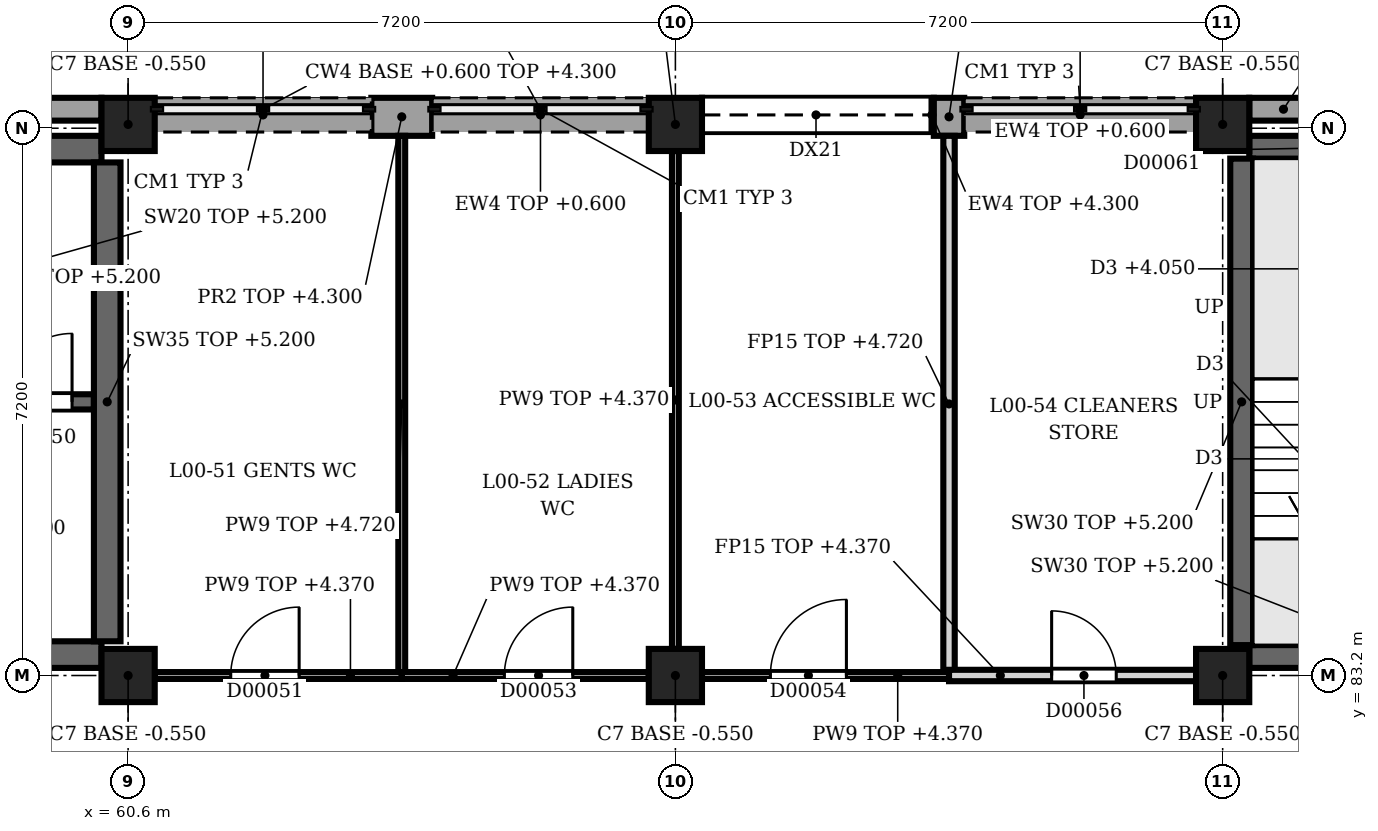
"""IFC4 building model, lengths in metres.
Left out: names, types, materials, properties, quantities, classifications, styles, units other than length and angle.
Written with IfcOpenShell. Run it as: python <this file> out.ifc"""

import sys

from ifc_helpers import new_model, si_unit, direction, frame, frame_2d, origin, origin_2d, place, context, subcontext, project, spatial, rectangle, extrude, element, fill, save


model = new_model("IFC4")
c1 = context("Model", 3, precision=1e-05, world=origin(), true_north=direction((0.0, 1.0)))
c2 = subcontext(c1, "Body", "Model", "MODEL_VIEW")
j1 = project(units=[si_unit("LENGTHUNIT", "METRE"), si_unit("PLANEANGLEUNIT", "RADIAN")], contexts=[c1])
p1 = place(None, origin())
s1 = spatial("IfcSite", under=j1, at=p1, CompositionType="ELEMENT")
p2 = place(p1, origin())
s2 = spatial("IfcBuilding", under=s1, at=p2, CompositionType="ELEMENT")
p3 = place(p2, origin())
s3 = spatial("IfcBuildingStorey", under=s2, at=p3, CompositionType="ELEMENT", Elevation=0.0)
for number, where, z_axis, x_axis in (
    (1, (60.6, 83.2, -0.55), (0.0, 0.0, 1.0), (1.0, 0.0, 0.0)),
    (2, (60.6, 90.45, -0.55), (0.0, 0.0, 1.0), (1.0, 0.0, 0.0)),
    (3, (67.8, 83.2, -0.55), (0.0, 0.0, 1.0), (1.0, 0.0, 0.0)),
    (4, (67.8, 90.45, -0.55), (0.0, 0.0, 1.0), (1.0, 0.0, 0.0)),
    (5, (75.0, 83.2, -0.55), (0.0, 0.0, 1.0), (1.0, 0.0, 0.0)),
    (6, (75.0, 90.45, -0.55), (0.0, 0.0, 1.0), (1.0, 0.0, 0.0)),
):
    element("IfcColumn", number, at=place(p3, frame(where, z_axis=z_axis, x_axis=x_axis)), inside=s3, PredefinedType="COLUMN", context=c2, shape_type="SweptSolid", body=[
        extrude(rectangle(XDim=0.7, YDim=0.7, at=origin_2d()), origin(), (0.0, 0.0, 1.0), 5.95),
    ])
p4 = place(p3, frame((63.8, 90.55, 0.0), z_axis=(0.0, 0.0, 1.0), x_axis=(1.0, 0.0, 0.0)))
e7 = element("IfcWall", 7, at=p4, inside=s3, PredefinedType="SOLIDWALL", context=c2, shape_type="SweptSolid", body=[
    extrude(rectangle(XDim=0.8, YDim=0.5, at=frame_2d((0.4, 0.0))), origin(), (0.0, 0.0, 1.0), 4.3),
])
p5 = place(p3, frame((71.2, 90.55, 0.0), z_axis=(0.0, 0.0, 1.0), x_axis=(1.0, 0.0, 0.0)))
e8 = element("IfcWall", 8, at=p5, inside=s3, PredefinedType="SOLIDWALL", context=c2, shape_type="SweptSolid", body=[
    extrude(rectangle(XDim=0.4, YDim=0.5, at=frame_2d((0.2, 0.0))), origin(), (0.0, 0.0, 1.0), 4.3),
])
p6 = place(p3, frame((57.4, 90.65, 0.0), z_axis=(0.0, 0.0, 1.0), x_axis=(1.0, 0.0, 0.0)))
e9 = element("IfcWall", 9, at=p6, inside=s3, PredefinedType="SOLIDWALL", context=c2, shape_type="SweptSolid", body=[
    extrude(rectangle(XDim=2.85, YDim=0.3, at=frame_2d((1.425, 0.0))), origin(), (0.0, 0.0, 1.0), 4.3),
])
p7 = place(p3, frame((60.95, 90.575, 0.0), z_axis=(0.0, 0.0, 1.0), x_axis=(1.0, 0.0, 0.0)))
e10 = element("IfcWall", 10, at=p7, inside=s3, PredefinedType="SOLIDWALL", context=c2, shape_type="SweptSolid", body=[
    extrude(rectangle(XDim=2.85, YDim=0.45, at=frame_2d((1.425, 0.0))), origin(), (0.0, 0.0, 1.0), 0.6),
])
p8 = place(p3, frame((64.6, 90.575, 0.0), z_axis=(0.0, 0.0, 1.0), x_axis=(1.0, 0.0, 0.0)))
e11 = element("IfcWall", 11, at=p8, inside=s3, PredefinedType="SOLIDWALL", context=c2, shape_type="SweptSolid", body=[
    extrude(rectangle(XDim=2.85, YDim=0.45, at=frame_2d((1.425, 0.0))), origin(), (0.0, 0.0, 1.0), 0.6),
])
p9 = place(p3, frame((68.15, 90.575, 0.0), z_axis=(0.0, 0.0, 1.0), x_axis=(1.0, 0.0, 0.0)))
e12 = element("IfcWall", 12, at=p9, inside=s3, PredefinedType="SOLIDWALL", context=c2, shape_type="SweptSolid", body=[
    extrude(rectangle(XDim=3.05, YDim=0.45, at=frame_2d((1.525, 0.0))), origin(), (0.0, 0.0, 1.0), 4.3),
])
p10 = place(p9, origin())
e13 = element("IfcOpeningElement", 13, at=p10, cuts=e12, PredefinedType="OPENING", context=c2, shape_type="SweptSolid", body=[
    extrude(rectangle(XDim=3.0, YDim=3.0, at=frame_2d((1.5, 1.5))), frame((0.0, 0.235, 0.0), z_axis=(0.0, -1.0, 0.0), x_axis=(1.0, 0.0, 0.0)), (0.0, 0.0, 1.0), 0.47),
])
p11 = place(p3, frame((71.6, 90.575, 0.0), z_axis=(0.0, 0.0, 1.0), x_axis=(1.0, 0.0, 0.0)))
e14 = element("IfcWall", 14, at=p11, inside=s3, PredefinedType="SOLIDWALL", context=c2, shape_type="SweptSolid", body=[
    extrude(rectangle(XDim=3.05, YDim=0.45, at=frame_2d((1.525, 0.0))), origin(), (0.0, 0.0, 1.0), 0.6),
])
p12 = place(p3, frame((75.35, 90.65, 0.0), z_axis=(0.0, 0.0, 1.0), x_axis=(1.0, 0.0, 0.0)))
e15 = element("IfcWall", 15, at=p12, inside=s3, PredefinedType="SOLIDWALL", context=c2, shape_type="SweptSolid", body=[
    extrude(rectangle(XDim=2.85, YDim=0.3, at=frame_2d((1.425, 0.0))), origin(), (0.0, 0.0, 1.0), 4.3),
])
p13 = place(p12, frame((0.9, 0.0, 0.0)))
e16 = element("IfcOpeningElement", 16, at=p13, cuts=e15, PredefinedType="OPENING", context=c2, shape_type="SweptSolid", body=[
    extrude(rectangle(XDim=1.1, YDim=2.2, at=frame_2d((0.55, 1.1))), frame((0.0, 0.16, 0.0), z_axis=(0.0, -1.0, 0.0), x_axis=(1.0, 0.0, 0.0)), (0.0, 0.0, 1.0), 0.32),
])
p14 = place(p12, frame((0.9, 0.0, 2.3)))
e17 = element("IfcOpeningElement", 17, at=p14, cuts=e15, PredefinedType="OPENING", context=c2, shape_type="SweptSolid", body=[
    extrude(rectangle(XDim=1.1, YDim=0.45, at=frame_2d((0.55, 0.225))), frame((0.0, 0.16, 0.0), z_axis=(0.0, -1.0, 0.0), x_axis=(1.0, 0.0, 0.0)), (0.0, 0.0, 1.0), 0.32),
])
p15 = place(p3, frame((53.75, 83.475, 0.0), z_axis=(0.0, 0.0, 1.0), x_axis=(1.0, 0.0, 0.0)))
e18 = element("IfcWall", 18, at=p15, inside=s3, PredefinedType="SHEAR", context=c2, shape_type="SweptSolid", body=[
    extrude(rectangle(XDim=6.5, YDim=0.35, at=frame_2d((3.25, 0.0))), origin(), (0.0, 0.0, 1.0), 5.2),
])
p16 = place(p15, frame((2.65, 0.0, 0.0)))
e19 = element("IfcOpeningElement", 19, at=p16, cuts=e18, PredefinedType="OPENING", context=c2, shape_type="SweptSolid", body=[
    extrude(rectangle(XDim=1.8, YDim=2.1, at=frame_2d((0.9, 1.05))), frame((0.0, 0.185, 0.0), z_axis=(0.0, -1.0, 0.0), x_axis=(1.0, 0.0, 0.0)), (0.0, 0.0, 1.0), 0.37),
])
p17 = place(p3, frame((53.75, 90.125, 0.0), z_axis=(0.0, 0.0, 1.0), x_axis=(1.0, 0.0, 0.0)))
e20 = element("IfcWall", 20, at=p17, inside=s3, PredefinedType="SHEAR", context=c2, shape_type="SweptSolid", body=[
    extrude(rectangle(XDim=6.5, YDim=0.35, at=frame_2d((3.25, 0.0))), origin(), (0.0, 0.0, 1.0), 5.2),
])
p18 = place(p3, frame((60.325, 83.65, 0.0), z_axis=(0.0, 0.0, 1.0), x_axis=(0.0, 1.0, 0.0)))
e21 = element("IfcWall", 21, at=p18, inside=s3, PredefinedType="SHEAR", context=c2, shape_type="SweptSolid", body=[
    extrude(rectangle(XDim=6.3, YDim=0.35, at=frame_2d((3.15, 0.0))), origin(), (0.0, 0.0, 1.0), 5.2),
])
p19 = place(p3, frame((60.15, 86.8, 0.0), z_axis=(0.0, 0.0, 1.0), x_axis=(-1.0, 0.0, 0.0)))
e22 = element("IfcWall", 22, at=p19, inside=s3, PredefinedType="SHEAR", context=c2, shape_type="SweptSolid", body=[
    extrude(rectangle(XDim=3.15, YDim=0.2, at=frame_2d((1.575, 0.0))), origin(), (0.0, 0.0, 1.0), 5.2),
])
p20 = place(p19, frame((1.962, 0.0, 0.0)))
e23 = element("IfcOpeningElement", 23, at=p20, cuts=e22, PredefinedType="OPENING", context=c2, shape_type="SweptSolid", body=[
    extrude(rectangle(XDim=0.9, YDim=2.1, at=frame_2d((0.45, 1.05))), frame((0.0, 0.11, 0.0), z_axis=(0.0, -1.0, 0.0), x_axis=(1.0, 0.0, 0.0)), (0.0, 0.0, 1.0), 0.22),
])
p21 = place(p19, frame((0.288, 0.0, 0.0)))
e24 = element("IfcOpeningElement", 24, at=p21, cuts=e22, PredefinedType="OPENING", context=c2, shape_type="SweptSolid", body=[
    extrude(rectangle(XDim=0.9, YDim=2.1, at=frame_2d((0.45, 1.05))), frame((0.0, 0.11, 0.0), z_axis=(0.0, -1.0, 0.0), x_axis=(1.0, 0.0, 0.0)), (0.0, 0.0, 1.0), 0.22),
])
p22 = place(p3, frame((75.35, 83.45, 0.0), z_axis=(0.0, 0.0, 1.0), x_axis=(1.0, 0.0, 0.0)))
e25 = element("IfcWall", 25, at=p22, inside=s3, PredefinedType="SHEAR", context=c2, shape_type="SweptSolid", body=[
    extrude(rectangle(XDim=6.5, YDim=0.3, at=frame_2d((3.25, 0.0))), origin(), (0.0, 0.0, 1.0), 5.2),
])
p23 = place(p22, frame((4.25, 0.0, 0.0)))
e26 = element("IfcOpeningElement", 26, at=p23, cuts=e25, PredefinedType="OPENING", context=c2, shape_type="SweptSolid", body=[
    extrude(rectangle(XDim=1.2, YDim=2.1, at=frame_2d((0.6, 1.05))), frame((0.0, 0.16, 0.0), z_axis=(0.0, -1.0, 0.0), x_axis=(1.0, 0.0, 0.0)), (0.0, 0.0, 1.0), 0.32),
])
p24 = place(p3, frame((75.35, 90.15, 0.0), z_axis=(0.0, 0.0, 1.0), x_axis=(1.0, 0.0, 0.0)))
e27 = element("IfcWall", 27, at=p24, inside=s3, PredefinedType="SHEAR", context=c2, shape_type="SweptSolid", body=[
    extrude(rectangle(XDim=6.5, YDim=0.3, at=frame_2d((3.25, 0.0))), origin(), (0.0, 0.0, 1.0), 5.2),
])
p25 = place(p24, frame((0.9, 0.0, 0.0)))
e28 = element("IfcOpeningElement", 28, at=p25, cuts=e27, PredefinedType="OPENING", context=c2, shape_type="SweptSolid", body=[
    extrude(rectangle(XDim=1.1, YDim=2.1, at=frame_2d((0.55, 1.05))), frame((0.0, 0.16, 0.0), z_axis=(0.0, -1.0, 0.0), x_axis=(1.0, 0.0, 0.0)), (0.0, 0.0, 1.0), 0.32),
])
p26 = place(p3, frame((75.25, 83.6, 0.0), z_axis=(0.0, 0.0, 1.0), x_axis=(0.0, 1.0, 0.0)))
e29 = element("IfcWall", 29, at=p26, inside=s3, PredefinedType="SHEAR", context=c2, shape_type="SweptSolid", body=[
    extrude(rectangle(XDim=6.4, YDim=0.3, at=frame_2d((3.2, 0.0))), origin(), (0.0, 0.0, 1.0), 5.2),
])
p27 = place(p3, frame((60.95, 83.2, 0.0), z_axis=(0.0, 0.0, 1.0), x_axis=(1.0, 0.0, 0.0)))
e30 = element("IfcWall", 30, at=p27, inside=s3, PredefinedType="PARTITIONING", context=c2, shape_type="SweptSolid", body=[
    extrude(rectangle(XDim=3.25, YDim=0.09, at=frame_2d((1.625, 0.0))), origin(), (0.0, 0.0, 1.0), 4.37),
])
p28 = place(p27, frame((1.0, 0.0, 0.0)))
e31 = element("IfcOpeningElement", 31, at=p28, cuts=e30, PredefinedType="OPENING", context=c2, shape_type="SweptSolid", body=[
    extrude(rectangle(XDim=0.9, YDim=2.1, at=frame_2d((0.45, 1.05))), frame((0.0, 0.055, 0.0), z_axis=(0.0, -1.0, 0.0), x_axis=(1.0, 0.0, 0.0)), (0.0, 0.0, 1.0), 0.11),
])
p29 = place(p3, frame((64.2, 83.2, 0.0), z_axis=(0.0, 0.0, 1.0), x_axis=(1.0, 0.0, 0.0)))
e32 = element("IfcWall", 32, at=p29, inside=s3, PredefinedType="PARTITIONING", context=c2, shape_type="SweptSolid", body=[
    extrude(rectangle(XDim=3.25, YDim=0.09, at=frame_2d((1.625, 0.0))), origin(), (0.0, 0.0, 1.0), 4.37),
])
p30 = place(p29, frame((1.35, 0.0, 0.0)))
e33 = element("IfcOpeningElement", 33, at=p30, cuts=e32, PredefinedType="OPENING", context=c2, shape_type="SweptSolid", body=[
    extrude(rectangle(XDim=0.9, YDim=2.1, at=frame_2d((0.45, 1.05))), frame((0.0, 0.055, 0.0), z_axis=(0.0, -1.0, 0.0), x_axis=(1.0, 0.0, 0.0)), (0.0, 0.0, 1.0), 0.11),
])
p31 = place(p3, frame((68.15, 83.2, 0.0), z_axis=(0.0, 0.0, 1.0), x_axis=(1.0, 0.0, 0.0)))
e34 = element("IfcWall", 34, at=p31, inside=s3, PredefinedType="PARTITIONING", context=c2, shape_type="SweptSolid", body=[
    extrude(rectangle(XDim=3.25, YDim=0.09, at=frame_2d((1.625, 0.0))), origin(), (0.0, 0.0, 1.0), 4.37),
])
p32 = place(p31, frame((0.9, 0.0, 0.0)))
e35 = element("IfcOpeningElement", 35, at=p32, cuts=e34, PredefinedType="OPENING", context=c2, shape_type="SweptSolid", body=[
    extrude(rectangle(XDim=1.0, YDim=2.2, at=frame_2d((0.5, 1.1))), frame((0.0, 0.055, 0.0), z_axis=(0.0, -1.0, 0.0), x_axis=(1.0, 0.0, 0.0)), (0.0, 0.0, 1.0), 0.11),
])
p33 = place(p3, frame((71.4, 83.2, 0.0), z_axis=(0.0, 0.0, 1.0), x_axis=(1.0, 0.0, 0.0)))
e36 = element("IfcWall", 36, at=p33, inside=s3, PredefinedType="PARTITIONING", context=c2, shape_type="SweptSolid", body=[
    extrude(rectangle(XDim=3.25, YDim=0.15, at=frame_2d((1.625, 0.0))), origin(), (0.0, 0.0, 1.0), 4.37),
])
p34 = place(p33, frame((1.35, 0.0, 0.0)))
e37 = element("IfcOpeningElement", 37, at=p34, cuts=e36, PredefinedType="OPENING", context=c2, shape_type="SweptSolid", body=[
    extrude(rectangle(XDim=0.85, YDim=2.1, at=frame_2d((0.425, 1.05))), frame((0.0, 0.085, 0.0), z_axis=(0.0, -1.0, 0.0), x_axis=(1.0, 0.0, 0.0)), (0.0, 0.0, 1.0), 0.17),
])
p35 = place(p3, frame((64.2, 83.245, 0.0), z_axis=(0.0, 0.0, 1.0), x_axis=(0.0, 1.0, 0.0)))
e38 = element("IfcWall", 38, at=p35, inside=s3, PredefinedType="PARTITIONING", context=c2, shape_type="SweptSolid", body=[
    extrude(rectangle(XDim=7.055, YDim=0.09, at=frame_2d((3.527, 0.0))), origin(), (0.0, 0.0, 1.0), 4.72),
])
p36 = place(p3, frame((67.8, 83.55, 0.0), z_axis=(0.0, 0.0, 1.0), x_axis=(0.0, 1.0, 0.0)))
e39 = element("IfcWall", 39, at=p36, inside=s3, PredefinedType="PARTITIONING", context=c2, shape_type="SweptSolid", body=[
    extrude(rectangle(XDim=6.55, YDim=0.09, at=frame_2d((3.275, 0.0))), origin(), (0.0, 0.0, 1.0), 4.37),
])
p37 = place(p3, frame((71.4, 83.245, 0.0), z_axis=(0.0, 0.0, 1.0), x_axis=(0.0, 1.0, 0.0)))
e40 = element("IfcWall", 40, at=p37, inside=s3, PredefinedType="PARTITIONING", context=c2, shape_type="SweptSolid", body=[
    extrude(rectangle(XDim=7.055, YDim=0.15, at=frame_2d((3.527, 0.0))), origin(), (0.0, 0.0, 1.0), 4.72),
])
p38 = place(p10, origin())
e41 = element("IfcDoor", 41, at=p38, inside=s3, OperationType="SINGLE_SWING_LEFT", PredefinedType="DOOR", context=c2, shape_type="SweptSolid", body=[
    extrude(rectangle(XDim=3.0, YDim=3.0, at=frame_2d((1.5, 1.5))), frame((0.0, 0.025, 0.0), z_axis=(0.0, -1.0, 0.0), x_axis=(1.0, 0.0, 0.0)), (0.0, 0.0, 1.0), 0.05),
])
fill(e13, e41)
p39 = place(p21, origin())
e42 = element("IfcDoor", 42, at=p39, inside=s3, OperationType="SINGLE_SWING_LEFT", PredefinedType="DOOR", context=c2, shape_type="SweptSolid", body=[
    extrude(rectangle(XDim=0.9, YDim=2.1, at=frame_2d((0.45, 1.05))), frame((0.0, 0.025, 0.0), z_axis=(0.0, -1.0, 0.0), x_axis=(1.0, 0.0, 0.0)), (0.0, 0.0, 1.0), 0.05),
])
fill(e24, e42)
p40 = place(p28, origin())
e43 = element("IfcDoor", 43, at=p40, inside=s3, OperationType="SINGLE_SWING_LEFT", PredefinedType="DOOR", context=c2, shape_type="SweptSolid", body=[
    extrude(rectangle(XDim=0.9, YDim=2.1, at=frame_2d((0.45, 1.05))), frame((0.0, 0.025, 0.0), z_axis=(0.0, -1.0, 0.0), x_axis=(1.0, 0.0, 0.0)), (0.0, 0.0, 1.0), 0.05),
])
fill(e31, e43)
p41 = place(p30, origin())
e44 = element("IfcDoor", 44, at=p41, inside=s3, OperationType="SINGLE_SWING_RIGHT", PredefinedType="DOOR", context=c2, shape_type="SweptSolid", body=[
    extrude(rectangle(XDim=0.9, YDim=2.1, at=frame_2d((0.45, 1.05))), frame((0.0, 0.025, 0.0), z_axis=(0.0, -1.0, 0.0), x_axis=(1.0, 0.0, 0.0)), (0.0, 0.0, 1.0), 0.05),
])
fill(e33, e44)
p42 = place(p32, origin())
e45 = element("IfcDoor", 45, at=p42, inside=s3, OperationType="SINGLE_SWING_LEFT", PredefinedType="DOOR", context=c2, shape_type="SweptSolid", body=[
    extrude(rectangle(XDim=1.0, YDim=2.2, at=frame_2d((0.5, 1.1))), frame((0.0, 0.025, 0.0), z_axis=(0.0, -1.0, 0.0), x_axis=(1.0, 0.0, 0.0)), (0.0, 0.0, 1.0), 0.05),
])
fill(e35, e45)
p43 = place(p34, origin())
e46 = element("IfcDoor", 46, at=p43, inside=s3, OperationType="SINGLE_SWING_RIGHT", PredefinedType="DOOR", context=c2, shape_type="SweptSolid", body=[
    extrude(rectangle(XDim=0.85, YDim=2.1, at=frame_2d((0.425, 1.05))), frame((0.0, 0.025, 0.0), z_axis=(0.0, -1.0, 0.0), x_axis=(1.0, 0.0, 0.0)), (0.0, 0.0, 1.0), 0.05),
])
fill(e37, e46)
save(model, sys.argv[1])
